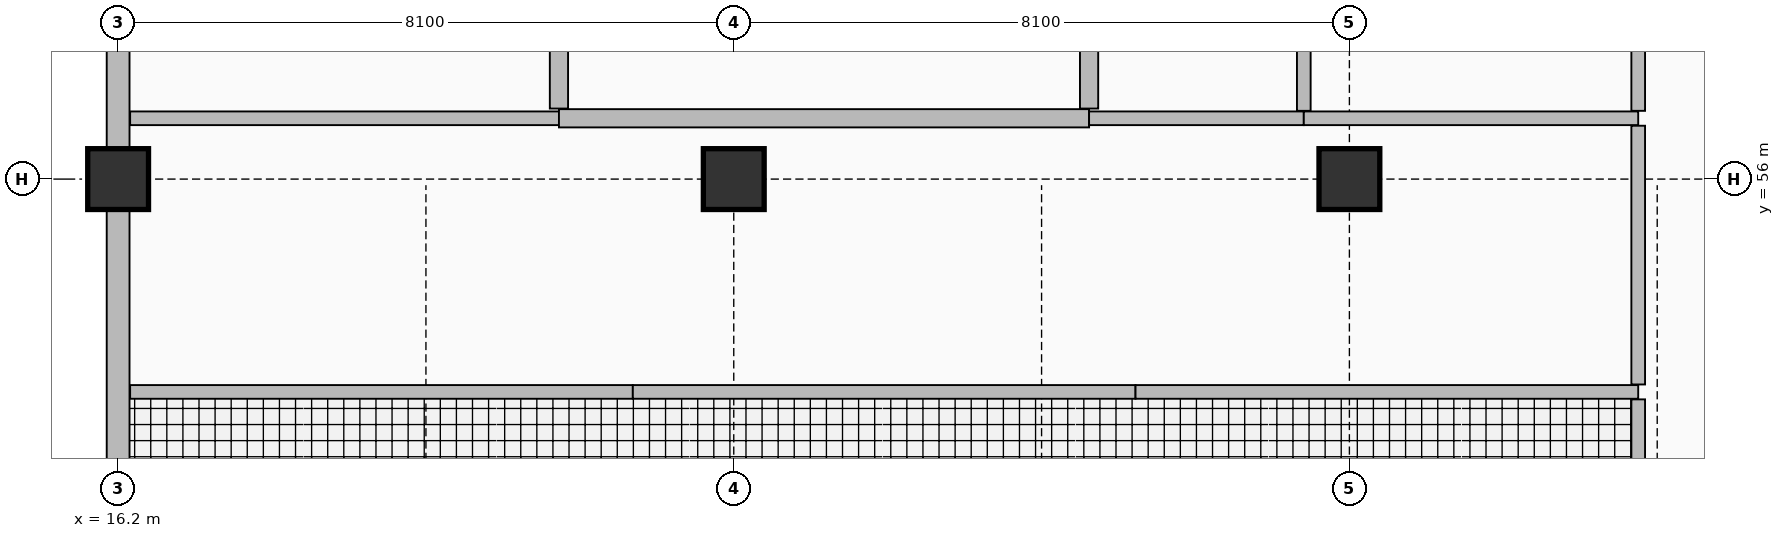
"""IFC4 building model, lengths in metres.
Left out: names, types, materials, properties, quantities, classifications, styles, units other than length and angle.
Written with IfcOpenShell. Run it as: python <this file> out.ifc"""

import sys

from ifc_helpers import new_model, si_unit, direction, frame, frame_2d, origin, origin_2d, place, context, subcontext, project, spatial, rectangle, extrude, element, fill, save


model = new_model("IFC4")
c1 = context("Model", 3, precision=1e-05, world=origin(), true_north=direction((0.0, 1.0)))
c2 = subcontext(c1, "Body", "Model", "MODEL_VIEW")
j1 = project(units=[si_unit("LENGTHUNIT", "METRE"), si_unit("PLANEANGLEUNIT", "RADIAN")], contexts=[c1])
p1 = place(None, origin())
s1 = spatial("IfcSite", under=j1, at=p1, CompositionType="ELEMENT")
p2 = place(p1, origin())
s2 = spatial("IfcBuilding", under=s1, at=p2, CompositionType="ELEMENT")
p3 = place(p2, origin())
s3 = spatial("IfcBuildingStorey", under=s2, at=p3, CompositionType="ELEMENT", Elevation=0.0)
for number, where, z_axis, x_axis in (
    (1, (16.2, 56.0, 0.0), (0.0, 0.0, 1.0), (1.0, 0.0, 0.0)),
    (2, (24.3, 56.0, 0.0), (0.0, 0.0, 1.0), (1.0, 0.0, 0.0)),
    (3, (32.4, 56.0, 0.0), (0.0, 0.0, 1.0), (1.0, 0.0, 0.0)),
):
    element("IfcColumn", number, at=place(p3, frame(where, z_axis=z_axis, x_axis=x_axis)), inside=s3, PredefinedType="COLUMN", context=c2, shape_type="SweptSolid", body=[
        extrude(rectangle(XDim=0.8, YDim=0.8, at=origin_2d()), origin(), (0.0, 0.0, 1.0), 5.4),
    ])
p4 = place(p3, frame((16.2, 65.2, 0.0), z_axis=(0.0, 0.0, 1.0), x_axis=(0.0, -1.0, 0.0)))
e4 = element("IfcWall", 4, at=p4, inside=s3, PredefinedType="SOLIDWALL", context=c2, shape_type="SweptSolid", body=[
    extrude(rectangle(XDim=15.6, YDim=0.3, at=frame_2d((7.8, 0.0))), origin(), (0.0, 0.0, 1.0), 4.512),
])
p5 = place(p4, frame((5.8, 0.0, 0.0)))
e5 = element("IfcOpeningElement", 5, at=p5, cuts=e4, PredefinedType="OPENING", context=c2, shape_type="SweptSolid", body=[
    extrude(rectangle(XDim=1.8, YDim=2.4, at=frame_2d((0.9, 1.2))), frame((0.0, 0.16, 0.0), z_axis=(0.0, -1.0, 0.0), x_axis=(1.0, 0.0, 0.0)), (0.0, 0.0, 1.0), 0.32),
])
for number, where, z_axis, x_axis in (
    (6, (16.358, 53.2, 0.0), (0.0, 0.0, 1.0), (1.0, 0.0, 0.0)),
    (7, (22.972, 53.2, 0.0), (0.0, 0.0, 1.0), (1.0, 0.0, 0.0)),
    (8, (29.586, 53.2, 0.0), (0.0, 0.0, 1.0), (1.0, 0.0, 0.0)),
):
    element("IfcWall", number, at=place(p3, frame(where, z_axis=z_axis, x_axis=x_axis)), inside=s3, PredefinedType="PARTITIONING", context=c2, shape_type="SweptSolid", body=[
        extrude(rectangle(XDim=6.614, YDim=0.18, at=frame_2d((3.307, 0.0))), origin(), (0.0, 0.0, 1.0), 5.12),
    ])
p6 = place(p3, frame((16.358, 56.8, 0.0), z_axis=(0.0, 0.0, 1.0), x_axis=(1.0, 0.0, 0.0)))
e9 = element("IfcWall", 9, at=p6, inside=s3, PredefinedType="PARTITIONING", context=c2, shape_type="SweptSolid", body=[
    extrude(rectangle(XDim=5.642, YDim=0.18, at=frame_2d((2.821, 0.0))), origin(), (0.0, 0.0, 1.0), 5.12),
])
p7 = place(p6, frame((2.271, 0.0, 0.0)))
e10 = element("IfcOpeningElement", 10, at=p7, cuts=e9, PredefinedType="OPENING", context=c2, shape_type="SweptSolid", body=[
    extrude(rectangle(XDim=1.1, YDim=2.2, at=frame_2d((0.55, 1.1))), frame((0.0, 0.1, 0.0), z_axis=(0.0, -1.0, 0.0), x_axis=(1.0, 0.0, 0.0)), (0.0, 0.0, 1.0), 0.2),
])
p8 = place(p3, frame((22.0, 56.8, 0.0), z_axis=(0.0, 0.0, 1.0), x_axis=(1.0, 0.0, 0.0)))
e11 = element("IfcWall", 11, at=p8, inside=s3, PredefinedType="PARTITIONING", context=c2, shape_type="SweptSolid", body=[
    extrude(rectangle(XDim=6.975, YDim=0.24, at=frame_2d((3.488, 0.0))), origin(), (0.0, 0.0, 1.0), 5.12),
])
p9 = place(p8, frame((4.003, 0.0, 0.0)))
e12 = element("IfcOpeningElement", 12, at=p9, cuts=e11, PredefinedType="OPENING", context=c2, shape_type="SweptSolid", body=[
    extrude(rectangle(XDim=1.2, YDim=2.3, at=frame_2d((0.6, 1.15))), frame((0.0, 0.13, 0.0), z_axis=(0.0, -1.0, 0.0), x_axis=(1.0, 0.0, 0.0)), (0.0, 0.0, 1.0), 0.26),
])
p10 = place(p3, frame((28.975, 56.8, 0.0), z_axis=(0.0, 0.0, 1.0), x_axis=(1.0, 0.0, 0.0)))
e13 = element("IfcWall", 13, at=p10, inside=s3, PredefinedType="PARTITIONING", context=c2, shape_type="SweptSolid", body=[
    extrude(rectangle(XDim=2.825, YDim=0.18, at=frame_2d((1.413, 0.0))), origin(), (0.0, 0.0, 1.0), 5.12),
])
p11 = place(p10, frame((0.636, 0.0, 0.0)))
e14 = element("IfcOpeningElement", 14, at=p11, cuts=e13, PredefinedType="OPENING", context=c2, shape_type="SweptSolid", body=[
    extrude(rectangle(XDim=1.1, YDim=2.2, at=frame_2d((0.55, 1.1))), frame((0.0, 0.1, 0.0), z_axis=(0.0, -1.0, 0.0), x_axis=(1.0, 0.0, 0.0)), (0.0, 0.0, 1.0), 0.2),
])
p12 = place(p3, frame((31.8, 56.8, 0.0), z_axis=(0.0, 0.0, 1.0), x_axis=(1.0, 0.0, 0.0)))
e15 = element("IfcWall", 15, at=p12, inside=s3, PredefinedType="PARTITIONING", context=c2, shape_type="SweptSolid", body=[
    extrude(rectangle(XDim=4.4, YDim=0.18, at=frame_2d((2.2, 0.0))), origin(), (0.0, 0.0, 1.0), 5.12),
])
p13 = place(p3, frame((22.0, 56.928, 0.0), z_axis=(0.0, 0.0, 1.0), x_axis=(0.0, 1.0, 0.0)))
e16 = element("IfcWall", 16, at=p13, inside=s3, PredefinedType="PARTITIONING", context=c2, shape_type="SweptSolid", body=[
    extrude(rectangle(XDim=3.164, YDim=0.24, at=frame_2d((1.582, 0.0))), origin(), (0.0, 0.0, 1.0), 5.12),
])
p14 = place(p13, frame((1.082, 0.0, 0.0)))
e17 = element("IfcOpeningElement", 17, at=p14, cuts=e16, PredefinedType="OPENING", context=c2, shape_type="SweptSolid", body=[
    extrude(rectangle(XDim=1.0, YDim=2.2, at=frame_2d((0.5, 1.1))), frame((0.0, 0.13, 0.0), z_axis=(0.0, -1.0, 0.0), x_axis=(1.0, 0.0, 0.0)), (0.0, 0.0, 1.0), 0.26),
])
p15 = place(p3, frame((28.975, 56.928, 0.0), z_axis=(0.0, 0.0, 1.0), x_axis=(0.0, 1.0, 0.0)))
e18 = element("IfcWall", 18, at=p15, inside=s3, PredefinedType="PARTITIONING", context=c2, shape_type="SweptSolid", body=[
    extrude(rectangle(XDim=3.164, YDim=0.24, at=frame_2d((1.582, 0.0))), origin(), (0.0, 0.0, 1.0), 5.12),
])
p16 = place(p3, frame((31.8, 56.898, 0.0), z_axis=(0.0, 0.0, 1.0), x_axis=(0.0, 1.0, 0.0)))
e19 = element("IfcWall", 19, at=p16, inside=s3, PredefinedType="PARTITIONING", context=c2, shape_type="SweptSolid", body=[
    extrude(rectangle(XDim=3.194, YDim=0.18, at=frame_2d((1.597, 0.0))), origin(), (0.0, 0.0, 1.0), 5.12),
])
p17 = place(p3, frame((36.2, 34.098, 0.0), z_axis=(0.0, 0.0, 1.0), x_axis=(0.0, 1.0, 0.0)))
e20 = element("IfcWall", 20, at=p17, inside=s3, PredefinedType="PARTITIONING", context=c2, shape_type="SweptSolid", body=[
    extrude(rectangle(XDim=19.004, YDim=0.18, at=frame_2d((9.502, 0.0))), origin(), (0.0, 0.0, 1.0), 4.705),
])
p18 = place(p17, frame((8.702, 0.0, 0.0)))
e21 = element("IfcOpeningElement", 21, at=p18, cuts=e20, PredefinedType="OPENING", context=c2, shape_type="SweptSolid", body=[
    extrude(rectangle(XDim=1.6, YDim=2.35, at=frame_2d((0.8, 1.175))), frame((0.0, 0.1, 0.0), z_axis=(0.0, -1.0, 0.0), x_axis=(1.0, 0.0, 0.0)), (0.0, 0.0, 1.0), 0.2),
])
p19 = place(p3, frame((36.2, 53.298, 0.0), z_axis=(0.0, 0.0, 1.0), x_axis=(0.0, 1.0, 0.0)))
e22 = element("IfcWall", 22, at=p19, inside=s3, PredefinedType="PARTITIONING", context=c2, shape_type="SweptSolid", body=[
    extrude(rectangle(XDim=3.404, YDim=0.18, at=frame_2d((1.702, 0.0))), origin(), (0.0, 0.0, 1.0), 4.705),
])
p20 = place(p19, frame((1.152, 0.0, 0.0)))
e23 = element("IfcOpeningElement", 23, at=p20, cuts=e22, PredefinedType="OPENING", context=c2, shape_type="SweptSolid", body=[
    extrude(rectangle(XDim=1.1, YDim=2.2, at=frame_2d((0.55, 1.1))), frame((0.0, 0.1, 0.0), z_axis=(0.0, -1.0, 0.0), x_axis=(1.0, 0.0, 0.0)), (0.0, 0.0, 1.0), 0.2),
])
p21 = place(p3, frame((36.2, 56.898, 0.0), z_axis=(0.0, 0.0, 1.0), x_axis=(0.0, 1.0, 0.0)))
e24 = element("IfcWall", 24, at=p21, inside=s3, PredefinedType="PARTITIONING", context=c2, shape_type="SweptSolid", body=[
    extrude(rectangle(XDim=3.404, YDim=0.18, at=frame_2d((1.702, 0.0))), origin(), (0.0, 0.0, 1.0), 5.12),
])
p22 = place(p21, frame((1.202, 0.0, 0.0)))
e25 = element("IfcOpeningElement", 25, at=p22, cuts=e24, PredefinedType="OPENING", context=c2, shape_type="SweptSolid", body=[
    extrude(rectangle(XDim=1.0, YDim=2.15, at=frame_2d((0.5, 1.075))), frame((0.0, 0.1, 0.0), z_axis=(0.0, -1.0, 0.0), x_axis=(1.0, 0.0, 0.0)), (0.0, 0.0, 1.0), 0.2),
])
p23 = place(p5, frame((1.8, 0.0, 0.0), z_axis=(0.0, 0.0, 1.0), x_axis=(-1.0, 0.0, 0.0)))
e26 = element("IfcDoor", 26, at=p23, inside=s3, OperationType="DOUBLE_DOOR_SINGLE_SWING", PredefinedType="DOOR", context=c2, shape_type="SweptSolid", body=[
    extrude(rectangle(XDim=1.8, YDim=2.4, at=frame_2d((0.9, 1.2))), frame((0.0, 0.025, 0.0), z_axis=(0.0, -1.0, 0.0), x_axis=(1.0, 0.0, 0.0)), (0.0, 0.0, 1.0), 0.05),
])
fill(e5, e26)
p24 = place(p7, frame((1.1, 0.0, 0.0), z_axis=(0.0, 0.0, 1.0), x_axis=(-1.0, 0.0, 0.0)))
e27 = element("IfcDoor", 27, at=p24, inside=s3, OperationType="SINGLE_SWING_LEFT", PredefinedType="DOOR", context=c2, shape_type="SweptSolid", body=[
    extrude(rectangle(XDim=1.1, YDim=2.2, at=frame_2d((0.55, 1.1))), frame((0.0, 0.025, 0.0), z_axis=(0.0, -1.0, 0.0), x_axis=(1.0, 0.0, 0.0)), (0.0, 0.0, 1.0), 0.05),
])
fill(e10, e27)
p25 = place(p9, frame((1.2, 0.0, 0.0), z_axis=(0.0, 0.0, 1.0), x_axis=(-1.0, 0.0, 0.0)))
e28 = element("IfcDoor", 28, at=p25, inside=s3, OperationType="SINGLE_SWING_RIGHT", PredefinedType="DOOR", context=c2, shape_type="SweptSolid", body=[
    extrude(rectangle(XDim=1.2, YDim=2.3, at=frame_2d((0.6, 1.15))), frame((0.0, 0.025, 0.0), z_axis=(0.0, -1.0, 0.0), x_axis=(1.0, 0.0, 0.0)), (0.0, 0.0, 1.0), 0.05),
])
fill(e12, e28)
p26 = place(p11, frame((1.1, 0.0, 0.0), z_axis=(0.0, 0.0, 1.0), x_axis=(-1.0, 0.0, 0.0)))
e29 = element("IfcDoor", 29, at=p26, inside=s3, OperationType="SINGLE_SWING_RIGHT", PredefinedType="DOOR", context=c2, shape_type="SweptSolid", body=[
    extrude(rectangle(XDim=1.1, YDim=2.2, at=frame_2d((0.55, 1.1))), frame((0.0, 0.025, 0.0), z_axis=(0.0, -1.0, 0.0), x_axis=(1.0, 0.0, 0.0)), (0.0, 0.0, 1.0), 0.05),
])
fill(e14, e29)
p27 = place(p20, origin())
e30 = element("IfcDoor", 30, at=p27, inside=s3, OperationType="SINGLE_SWING_LEFT", PredefinedType="DOOR", context=c2, shape_type="SweptSolid", body=[
    extrude(rectangle(XDim=1.1, YDim=2.2, at=frame_2d((0.55, 1.1))), frame((0.0, 0.025, 0.0), z_axis=(0.0, -1.0, 0.0), x_axis=(1.0, 0.0, 0.0)), (0.0, 0.0, 1.0), 0.05),
])
fill(e23, e30)
save(model, sys.argv[1])
